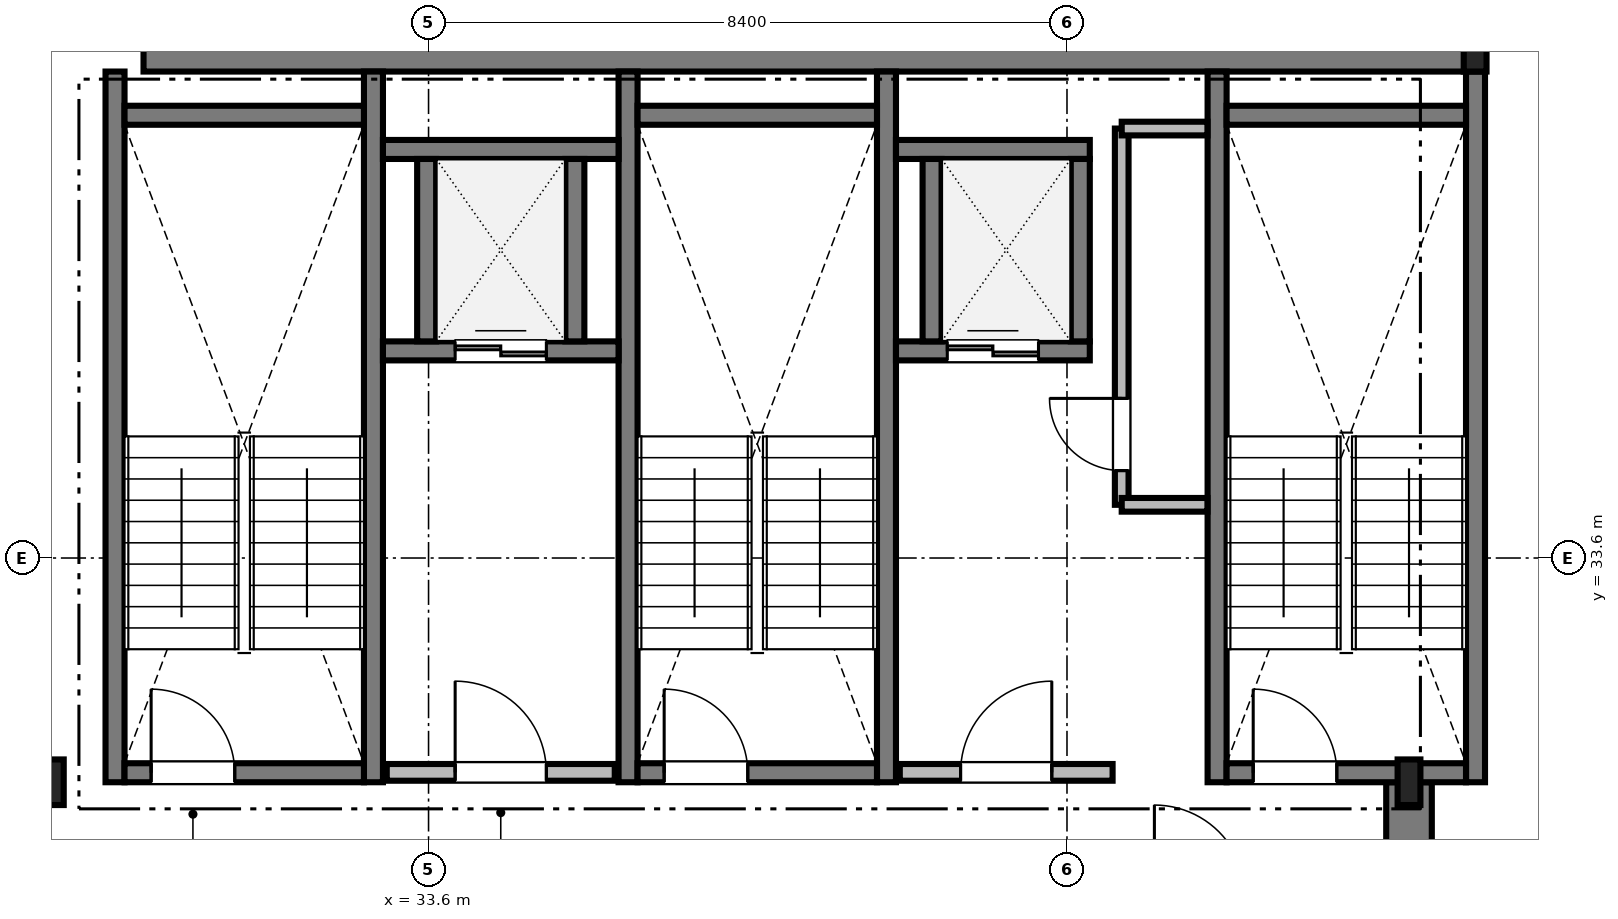
"""IFC4 building model, lengths in metres.
Left out: names, types, materials, properties, quantities, classifications, styles, units other than length and angle.
Written with IfcOpenShell. Run it as: python <this file> out.ifc"""

import sys

from ifc_helpers import new_model, si_unit, direction, frame, frame_2d, origin, origin_2d, place, context, subcontext, project, spatial, rectangle, i_section, extrude, source, transform, mapped, element, fill, save


model = new_model("IFC4")
c1 = context("Model", 3, precision=1e-05, world=origin(), true_north=direction((0.0, 1.0)))
c2 = subcontext(c1, "Body", "Model", "MODEL_VIEW")
j1 = project(units=[si_unit("LENGTHUNIT", "METRE"), si_unit("PLANEANGLEUNIT", "RADIAN")], contexts=[c1])
p1 = place(None, origin())
s1 = spatial("IfcSite", under=j1, at=p1, CompositionType="ELEMENT")
p2 = place(p1, origin())
s2 = spatial("IfcBuilding", under=s1, at=p2, CompositionType="ELEMENT")
p3 = place(p2, frame((0.0, 0.0, 274.3)))
s3 = spatial("IfcBuildingStorey", under=s2, at=p3, CompositionType="ELEMENT", Elevation=274.3)
m1 = source(origin(), c2, "Body", "SweptSolid", [
    extrude(rectangle(XDim=17.52, YDim=0.6, at=frame_2d((8.76, 0.0))), origin(), (0.0, 0.0, 1.0), 3.3),
])
p4 = place(p3, frame((29.85, 40.3, 0.0), z_axis=(0.0, 0.0, 1.0), x_axis=(1.0, 0.0, 0.0)))
e1 = element("IfcWall", 1, at=p4, inside=s3, PredefinedType="SHEAR", context=c2, shape_type="MappedRepresentation", body=[
    mapped(m1, transform((0.0, 0.0, 0.0), scale=1.0)),
])
m2 = source(origin(), c2, "Body", "SweptSolid", [
    extrude(rectangle(XDim=13.15, YDim=0.6, at=frame_2d((6.575, 0.0))), origin(), (0.0, 0.0, 1.0), 3.3),
])
p5 = place(p3, frame((46.5, 17.5, 0.0), z_axis=(0.0, 0.0, 1.0), x_axis=(0.0, 1.0, 0.0)))
e2 = element("IfcWall", 2, at=p5, inside=s3, PredefinedType="SHEAR", context=c2, shape_type="MappedRepresentation", body=[
    mapped(m2, transform((0.0, 0.0, 0.0), scale=1.0)),
])
m3 = source(origin(), c2, "Body", "SweptSolid", [
    extrude(i_section(OverallWidth=0.3, OverallDepth=0.6, WebThickness=0.015, FlangeThickness=0.03, FilletRadius=0.027, at=origin_2d()), origin(), (0.0, 0.0, 1.0), 3.3),
])
for number, where, z_axis, x_axis in (
    (3, (28.65, 30.65, 0.0), (0.0, 0.0, 1.0), (1.0, 0.0, 0.0)),
    (4, (46.5, 30.65, 0.0), (0.0, 0.0, 1.0), (1.0, 0.0, 0.0)),
    (5, (47.37, 40.3, 0.0), (0.0, 0.0, 1.0), (1.0, 0.0, 0.0)),
):
    element("IfcColumn", number, at=place(p3, frame(where, z_axis=z_axis, x_axis=x_axis)), inside=s3, PredefinedType="COLUMN", context=c2, shape_type="MappedRepresentation", body=[
        mapped(m3, transform((0.0, 0.0, 0.0), scale=1.0)),
    ])
m4 = source(origin(), c2, "Body", "SweptSolid", [
    extrude(rectangle(XDim=9.35, YDim=0.25, at=frame_2d((4.675, 0.0))), origin(), (0.0, 0.0, 1.0), 3.75),
])
for number, where, z_axis, x_axis in (
    (6, (29.475, 30.65, 0.0), (0.0, 0.0, 1.0), (0.0, 1.0, 0.0)),
    (7, (32.875, 30.65, 0.0), (0.0, 0.0, 1.0), (0.0, 1.0, 0.0)),
):
    element("IfcWall", number, at=place(p3, frame(where, z_axis=z_axis, x_axis=x_axis)), inside=s3, PredefinedType="SOLIDWALL", context=c2, shape_type="MappedRepresentation", body=[
        mapped(m4, transform((0.0, 0.0, 0.0), scale=1.0)),
    ])
m5 = source(origin(), c2, "Body", "SweptSolid", [
    extrude(rectangle(XDim=3.15, YDim=0.25, at=frame_2d((1.575, 0.0))), origin(), (0.0, 0.0, 1.0), 3.75),
])
p6 = place(p3, frame((29.6, 39.425, 0.0), z_axis=(0.0, 0.0, 1.0), x_axis=(1.0, 0.0, 0.0)))
e8 = element("IfcWall", 8, at=p6, inside=s3, PredefinedType="SOLIDWALL", context=c2, shape_type="MappedRepresentation", body=[
    mapped(m5, transform((0.0, 0.0, 0.0), scale=1.0)),
])
p7 = place(p3, frame((29.6, 30.775, 0.0), z_axis=(0.0, 0.0, 1.0), x_axis=(1.0, 0.0, 0.0)))
e9 = element("IfcWall", 9, at=p7, inside=s3, PredefinedType="SOLIDWALL", context=c2, shape_type="MappedRepresentation", body=[
    mapped(m5, transform((0.0, 0.0, 0.0), scale=1.0)),
])
m6 = source(origin(), c2, "Body", "SweptSolid", [
    extrude(rectangle(XDim=1.1, YDim=2.2, at=frame_2d((0.55, 1.1))), frame((0.0, 0.135, 0.0), z_axis=(0.0, -1.0, 0.0), x_axis=(1.0, 0.0, 0.0)), (0.0, 0.0, 1.0), 0.27),
])
p8 = place(p7, frame((0.35, 0.0, 0.0)))
e10 = element("IfcOpeningElement", 10, at=p8, cuts=e9, PredefinedType="OPENING", context=c2, shape_type="MappedRepresentation", body=[
    mapped(m6, transform((0.0, 0.0, 0.0), scale=1.0)),
])
for number, where, z_axis, x_axis in (
    (11, (36.225, 30.65, 0.0), (0.0, 0.0, 1.0), (0.0, 1.0, 0.0)),
    (12, (39.625, 30.65, 0.0), (0.0, 0.0, 1.0), (0.0, 1.0, 0.0)),
):
    element("IfcWall", number, at=place(p3, frame(where, z_axis=z_axis, x_axis=x_axis)), inside=s3, PredefinedType="SOLIDWALL", context=c2, shape_type="MappedRepresentation", body=[
        mapped(m4, transform((0.0, 0.0, 0.0), scale=1.0)),
    ])
p9 = place(p3, frame((36.35, 39.425, 0.0), z_axis=(0.0, 0.0, 1.0), x_axis=(1.0, 0.0, 0.0)))
e13 = element("IfcWall", 13, at=p9, inside=s3, PredefinedType="SOLIDWALL", context=c2, shape_type="MappedRepresentation", body=[
    mapped(m5, transform((0.0, 0.0, 0.0), scale=1.0)),
])
p10 = place(p3, frame((36.35, 30.775, 0.0), z_axis=(0.0, 0.0, 1.0), x_axis=(1.0, 0.0, 0.0)))
e14 = element("IfcWall", 14, at=p10, inside=s3, PredefinedType="SOLIDWALL", context=c2, shape_type="MappedRepresentation", body=[
    mapped(m5, transform((0.0, 0.0, 0.0), scale=1.0)),
])
p11 = place(p10, frame((0.35, 0.0, 0.0)))
e15 = element("IfcOpeningElement", 15, at=p11, cuts=e14, PredefinedType="OPENING", context=c2, shape_type="MappedRepresentation", body=[
    mapped(m6, transform((0.0, 0.0, 0.0), scale=1.0)),
])
for number, where, z_axis, x_axis in (
    (16, (43.975, 30.65, 0.0), (0.0, 0.0, 1.0), (0.0, 1.0, 0.0)),
    (17, (47.375, 30.65, 0.0), (0.0, 0.0, 1.0), (0.0, 1.0, 0.0)),
):
    element("IfcWall", number, at=place(p3, frame(where, z_axis=z_axis, x_axis=x_axis)), inside=s3, PredefinedType="SOLIDWALL", context=c2, shape_type="MappedRepresentation", body=[
        mapped(m4, transform((0.0, 0.0, 0.0), scale=1.0)),
    ])
p12 = place(p3, frame((44.1, 39.425, 0.0), z_axis=(0.0, 0.0, 1.0), x_axis=(1.0, 0.0, 0.0)))
e18 = element("IfcWall", 18, at=p12, inside=s3, PredefinedType="SOLIDWALL", context=c2, shape_type="MappedRepresentation", body=[
    mapped(m5, transform((0.0, 0.0, 0.0), scale=1.0)),
])
p13 = place(p3, frame((44.1, 30.775, 0.0), z_axis=(0.0, 0.0, 1.0), x_axis=(1.0, 0.0, 0.0)))
e19 = element("IfcWall", 19, at=p13, inside=s3, PredefinedType="SOLIDWALL", context=c2, shape_type="MappedRepresentation", body=[
    mapped(m5, transform((0.0, 0.0, 0.0), scale=1.0)),
])
p14 = place(p13, frame((0.35, 0.0, 0.0)))
e20 = element("IfcOpeningElement", 20, at=p14, cuts=e19, PredefinedType="OPENING", context=c2, shape_type="MappedRepresentation", body=[
    mapped(m6, transform((0.0, 0.0, 0.0), scale=1.0)),
])
m7 = source(origin(), c2, "Body", "SweptSolid", [
    extrude(rectangle(XDim=3.0, YDim=0.22, at=frame_2d((1.5, 0.0))), origin(), (0.0, 0.0, 1.0), 3.3),
])
p15 = place(p3, frame((33.05, 30.78, 0.0), z_axis=(0.0, 0.0, 1.0), x_axis=(1.0, 0.0, 0.0)))
e21 = element("IfcWall", 21, at=p15, inside=s3, PredefinedType="SOLIDWALL", context=c2, shape_type="MappedRepresentation", body=[
    mapped(m7, transform((0.0, 0.0, 0.0), scale=1.0)),
])
m8 = source(origin(), c2, "Body", "SweptSolid", [
    extrude(rectangle(XDim=1.2, YDim=2.2, at=frame_2d((0.6, 1.1))), frame((0.0, 0.12, 0.0), z_axis=(0.0, -1.0, 0.0), x_axis=(1.0, 0.0, 0.0)), (0.0, 0.0, 1.0), 0.24),
])
p16 = place(p15, frame((0.9, 0.0, 0.0)))
e22 = element("IfcOpeningElement", 22, at=p16, cuts=e21, PredefinedType="OPENING", context=c2, shape_type="MappedRepresentation", body=[
    mapped(m8, transform((0.0, 0.0, 0.0), scale=1.0)),
])
m9 = source(origin(), c2, "Body", "SweptSolid", [
    extrude(rectangle(XDim=2.8, YDim=0.22, at=frame_2d((1.4, 0.0))), origin(), (0.0, 0.0, 1.0), 3.3),
])
p17 = place(p3, frame((39.8, 30.78, 0.0), z_axis=(0.0, 0.0, 1.0), x_axis=(1.0, 0.0, 0.0)))
e23 = element("IfcWall", 23, at=p17, inside=s3, PredefinedType="SOLIDWALL", context=c2, shape_type="MappedRepresentation", body=[
    mapped(m9, transform((0.0, 0.0, 0.0), scale=1.0)),
])
p18 = place(p17, frame((0.8, 0.0, 0.0)))
e24 = element("IfcOpeningElement", 24, at=p18, cuts=e23, PredefinedType="OPENING", context=c2, shape_type="MappedRepresentation", body=[
    mapped(m8, transform((0.0, 0.0, 0.0), scale=1.0)),
])
m10 = source(origin(), c2, "Body", "SweptSolid", [
    extrude(rectangle(XDim=3.1, YDim=0.25, at=frame_2d((1.55, 0.0))), origin(), (0.0, 0.0, 1.0), 3.3),
])
p19 = place(p3, frame((33.0, 36.325, 0.0), z_axis=(0.0, 0.0, 1.0), x_axis=(1.0, 0.0, 0.0)))
e25 = element("IfcWall", 25, at=p19, inside=s3, PredefinedType="SOLIDWALL", context=c2, shape_type="MappedRepresentation", body=[
    mapped(m10, transform((0.0, 0.0, 0.0), scale=1.0)),
])
m11 = source(origin(), c2, "Body", "SweptSolid", [
    extrude(rectangle(XDim=1.2, YDim=2.25, at=frame_2d((0.6, 1.125))), frame((0.0, 0.135, 0.0), z_axis=(0.0, -1.0, 0.0), x_axis=(1.0, 0.0, 0.0)), (0.0, 0.0, 1.0), 0.27),
])
p20 = place(p19, frame((0.95, 0.0, 0.0)))
e26 = element("IfcOpeningElement", 26, at=p20, cuts=e25, PredefinedType="OPENING", context=c2, shape_type="MappedRepresentation", body=[
    mapped(m11, transform((0.0, 0.0, 0.0), scale=1.0)),
])
p21 = place(p3, frame((33.0, 38.975, 0.0), z_axis=(0.0, 0.0, 1.0), x_axis=(1.0, 0.0, 0.0)))
e27 = element("IfcWall", 27, at=p21, inside=s3, PredefinedType="SOLIDWALL", context=c2, shape_type="MappedRepresentation", body=[
    mapped(m10, transform((0.0, 0.0, 0.0), scale=1.0)),
])
m12 = source(origin(), c2, "Body", "SweptSolid", [
    extrude(rectangle(XDim=2.4, YDim=0.25, at=frame_2d((1.2, 0.0))), origin(), (0.0, 0.0, 1.0), 3.3),
])
for number, where, z_axis, x_axis in (
    (28, (33.575, 36.45, 0.0), (0.0, 0.0, 1.0), (0.0, 1.0, 0.0)),
    (29, (35.525, 36.45, 0.0), (0.0, 0.0, 1.0), (0.0, 1.0, 0.0)),
):
    element("IfcWall", number, at=place(p3, frame(where, z_axis=z_axis, x_axis=x_axis)), inside=s3, PredefinedType="SOLIDWALL", context=c2, shape_type="MappedRepresentation", body=[
        mapped(m12, transform((0.0, 0.0, 0.0), scale=1.0)),
    ])
m13 = source(origin(), c2, "Body", "SweptSolid", [
    extrude(rectangle(XDim=2.55, YDim=0.25, at=frame_2d((1.275, 0.0))), origin(), (0.0, 0.0, 1.0), 3.3),
])
p22 = place(p3, frame((39.75, 36.325, 0.0), z_axis=(0.0, 0.0, 1.0), x_axis=(1.0, 0.0, 0.0)))
e30 = element("IfcWall", 30, at=p22, inside=s3, PredefinedType="SOLIDWALL", context=c2, shape_type="MappedRepresentation", body=[
    mapped(m13, transform((0.0, 0.0, 0.0), scale=1.0)),
])
p23 = place(p22, frame((0.675, 0.0, 0.0)))
e31 = element("IfcOpeningElement", 31, at=p23, cuts=e30, PredefinedType="OPENING", context=c2, shape_type="MappedRepresentation", body=[
    mapped(m11, transform((0.0, 0.0, 0.0), scale=1.0)),
])
p24 = place(p3, frame((39.75, 38.975, 0.0), z_axis=(0.0, 0.0, 1.0), x_axis=(1.0, 0.0, 0.0)))
e32 = element("IfcWall", 32, at=p24, inside=s3, PredefinedType="SOLIDWALL", context=c2, shape_type="MappedRepresentation", body=[
    mapped(m13, transform((0.0, 0.0, 0.0), scale=1.0)),
])
for number, where, z_axis, x_axis in (
    (33, (40.225, 36.45, 0.0), (0.0, 0.0, 1.0), (0.0, 1.0, 0.0)),
    (34, (42.175, 36.45, 0.0), (0.0, 0.0, 1.0), (0.0, 1.0, 0.0)),
):
    element("IfcWall", number, at=place(p3, frame(where, z_axis=z_axis, x_axis=x_axis)), inside=s3, PredefinedType="SOLIDWALL", context=c2, shape_type="MappedRepresentation", body=[
        mapped(m12, transform((0.0, 0.0, 0.0), scale=1.0)),
    ])
m14 = source(origin(), c2, "Body", "SweptSolid", [
    extrude(rectangle(XDim=4.95, YDim=0.18, at=frame_2d((2.475, 0.0))), origin(), (0.0, 0.0, 1.0), 3.3),
])
p25 = place(p3, frame((42.72, 34.3, 0.0), z_axis=(0.0, 0.0, 1.0), x_axis=(0.0, 1.0, 0.0)))
e35 = element("IfcWall", 35, at=p25, inside=s3, PredefinedType="PARTITIONING", context=c2, shape_type="MappedRepresentation", body=[
    mapped(m14, transform((0.0, 0.0, 0.0), scale=1.0)),
])
m15 = source(origin(), c2, "Body", "SweptSolid", [
    extrude(rectangle(XDim=0.95, YDim=2.15, at=frame_2d((0.475, 1.075))), frame((0.0, 0.1, 0.0), z_axis=(0.0, -1.0, 0.0), x_axis=(1.0, 0.0, 0.0)), (0.0, 0.0, 1.0), 0.2),
])
p26 = place(p25, frame((0.45, 0.0, 0.0)))
e36 = element("IfcOpeningElement", 36, at=p26, cuts=e35, PredefinedType="OPENING", context=c2, shape_type="MappedRepresentation", body=[
    mapped(m15, transform((0.0, 0.0, 0.0), scale=1.0)),
])
m16 = source(origin(), c2, "Body", "SweptSolid", [
    extrude(rectangle(XDim=1.128, YDim=0.18, at=frame_2d((0.564, 0.0))), origin(), (0.0, 0.0, 1.0), 3.3),
])
for number, where, z_axis, x_axis in (
    (37, (42.72, 34.3, 0.0), (0.0, 0.0, 1.0), (1.0, 0.0, 0.0)),
    (38, (42.72, 39.25, 0.0), (0.0, 0.0, 1.0), (1.0, 0.0, 0.0)),
):
    element("IfcWall", number, at=place(p3, frame(where, z_axis=z_axis, x_axis=x_axis)), inside=s3, PredefinedType="PARTITIONING", context=c2, shape_type="MappedRepresentation", body=[
        mapped(m16, transform((0.0, 0.0, 0.0), scale=1.0)),
    ])
m17 = source(origin(), c2, "Body", "SweptSolid", [
    extrude(rectangle(XDim=1.1, YDim=2.2, at=frame_2d((0.55, 1.1))), frame((0.0, 0.025, 0.0), z_axis=(0.0, -1.0, 0.0), x_axis=(1.0, 0.0, 0.0)), (0.0, 0.0, 1.0), 0.05),
])
p27 = place(p8, origin())
e39 = element("IfcDoor", 39, at=p27, inside=s3, OperationType="SINGLE_SWING_LEFT", PredefinedType="DOOR", context=c2, shape_type="MappedRepresentation", body=[
    mapped(m17, transform((0.0, 0.0, 0.0), scale=1.0)),
])
fill(e10, e39)
p28 = place(p11, origin())
e40 = element("IfcDoor", 40, at=p28, inside=s3, OperationType="SINGLE_SWING_LEFT", PredefinedType="DOOR", context=c2, shape_type="MappedRepresentation", body=[
    mapped(m17, transform((0.0, 0.0, 0.0), scale=1.0)),
])
fill(e15, e40)
p29 = place(p14, origin())
e41 = element("IfcDoor", 41, at=p29, inside=s3, OperationType="SINGLE_SWING_LEFT", PredefinedType="DOOR", context=c2, shape_type="MappedRepresentation", body=[
    mapped(m17, transform((0.0, 0.0, 0.0), scale=1.0)),
])
fill(e20, e41)
m18 = source(origin(), c2, "Body", "SweptSolid", [
    extrude(rectangle(XDim=1.2, YDim=2.2, at=frame_2d((0.6, 1.1))), frame((0.0, 0.025, 0.0), z_axis=(0.0, -1.0, 0.0), x_axis=(1.0, 0.0, 0.0)), (0.0, 0.0, 1.0), 0.05),
])
p30 = place(p16, origin())
e42 = element("IfcDoor", 42, at=p30, inside=s3, OperationType="SINGLE_SWING_LEFT", PredefinedType="DOOR", context=c2, shape_type="MappedRepresentation", body=[
    mapped(m18, transform((0.0, 0.0, 0.0), scale=1.0)),
])
fill(e22, e42)
p31 = place(p18, origin())
e43 = element("IfcDoor", 43, at=p31, inside=s3, OperationType="SINGLE_SWING_RIGHT", PredefinedType="DOOR", context=c2, shape_type="MappedRepresentation", body=[
    mapped(m18, transform((0.0, 0.0, 0.0), scale=1.0)),
])
fill(e24, e43)
m19 = source(origin(), c2, "Body", "SweptSolid", [
    extrude(rectangle(XDim=1.2, YDim=2.25, at=frame_2d((0.6, 1.125))), frame((0.0, 0.025, 0.0), z_axis=(0.0, -1.0, 0.0), x_axis=(1.0, 0.0, 0.0)), (0.0, 0.0, 1.0), 0.05),
])
p32 = place(p20, origin())
e44 = element("IfcDoor", 44, at=p32, inside=s3, OperationType="DOUBLE_DOOR_SLIDING", PredefinedType="DOOR", context=c2, shape_type="MappedRepresentation", body=[
    mapped(m19, transform((0.0, 0.0, 0.0), scale=1.0)),
])
fill(e26, e44)
p33 = place(p23, origin())
e45 = element("IfcDoor", 45, at=p33, inside=s3, OperationType="DOUBLE_DOOR_SLIDING", PredefinedType="DOOR", context=c2, shape_type="MappedRepresentation", body=[
    mapped(m19, transform((0.0, 0.0, 0.0), scale=1.0)),
])
fill(e31, e45)
m20 = source(origin(), c2, "Body", "SweptSolid", [
    extrude(rectangle(XDim=0.95, YDim=2.15, at=frame_2d((0.475, 1.075))), frame((0.0, 0.025, 0.0), z_axis=(0.0, -1.0, 0.0), x_axis=(1.0, 0.0, 0.0)), (0.0, 0.0, 1.0), 0.05),
])
p34 = place(p26, origin())
e46 = element("IfcDoor", 46, at=p34, inside=s3, OperationType="SINGLE_SWING_RIGHT", PredefinedType="DOOR", context=c2, shape_type="MappedRepresentation", body=[
    mapped(m20, transform((0.0, 0.0, 0.0), scale=1.0)),
])
fill(e36, e46)
save(model, sys.argv[1])
